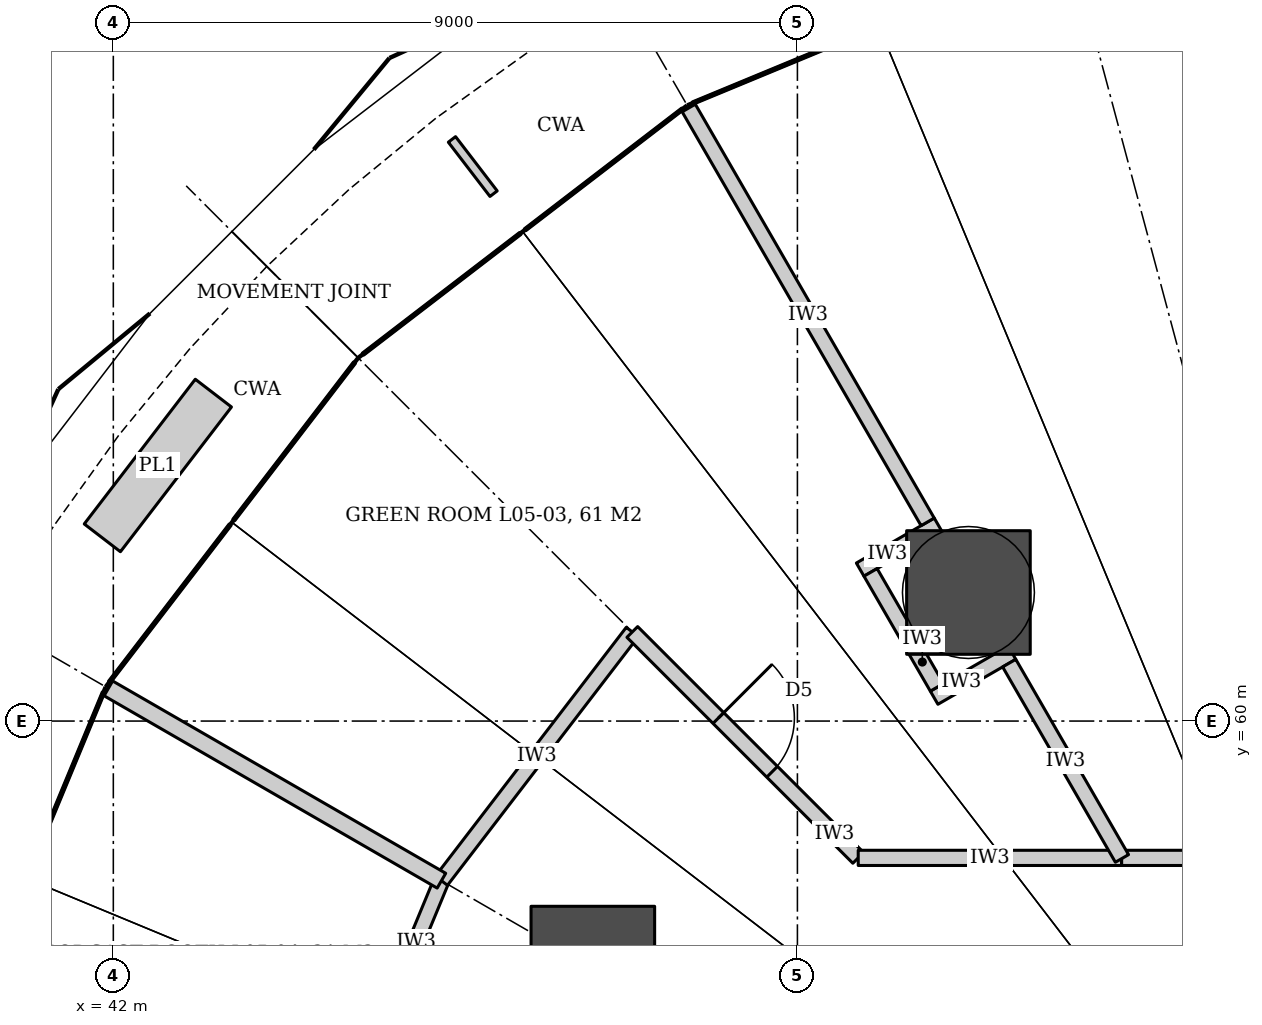
"""IFC4 building model, lengths in metres.
Left out: names, types, materials, properties, quantities, classifications, styles, units other than length and angle.
Written with IfcOpenShell. Run it as: python <this file> out.ifc"""

import sys

from ifc_helpers import new_model, si_unit, direction, frame, frame_2d, origin, origin_2d, place, context, subcontext, project, spatial, rectangle, hollow_circle, extrude, element, fill, save


model = new_model("IFC4")
c1 = context("Model", 3, precision=1e-05, world=origin(), true_north=direction((0.0, 1.0)))
c2 = subcontext(c1, "Body", "Model", "MODEL_VIEW")
j1 = project(units=[si_unit("LENGTHUNIT", "METRE"), si_unit("PLANEANGLEUNIT", "RADIAN")], contexts=[c1])
p1 = place(None, origin())
s1 = spatial("IfcSite", under=j1, at=p1, CompositionType="ELEMENT")
p2 = place(p1, origin())
s2 = spatial("IfcBuilding", under=s1, at=p2, CompositionType="ELEMENT")
p3 = place(p2, frame((0.0, 0.0, 30.2)))
s3 = spatial("IfcBuildingStorey", under=s2, at=p3, CompositionType="ELEMENT", Elevation=30.2)
for number, where, z_axis, x_axis in (
    (1, (53.25, 61.691, 0.0), (0.0, 0.0, 1.0), (1.0, 0.0, 0.0)),
    (2, (48.309, 56.75, 0.0), (0.0, 0.0, 1.0), (1.0, 0.0, 0.0)),
):
    element("IfcColumn", number, at=place(p3, frame(where, z_axis=z_axis, x_axis=x_axis)), inside=s3, PredefinedType="COLUMN", context=c2, shape_type="SweptSolid", body=[
        extrude(hollow_circle(Radius=0.813, WallThickness=0.08, at=origin_2d()), origin(), (0.0, 0.0, 1.0), 4.2),
    ])
p4 = place(p3, frame((44.738, 54.089, 0.0), z_axis=(0.0, 0.0, 1.0), x_axis=(0.382731667114, 0.923859551549, 0.0)))
e3 = element("IfcWall", 3, at=p4, inside=s3, PredefinedType="PARTITIONING", context=c2, shape_type="SweptSolid", body=[
    extrude(rectangle(XDim=4.125, YDim=0.2, at=frame_2d((2.062, 0.0))), origin(), (0.0, 0.0, 1.0), 3.04),
])
p5 = place(p4, frame((1.462, 0.0, 0.0)))
e4 = element("IfcOpeningElement", 4, at=p5, cuts=e3, PredefinedType="OPENING", context=c2, shape_type="SweptSolid", body=[
    extrude(rectangle(XDim=1.2, YDim=2.4, at=frame_2d((0.6, 1.2))), frame((0.0, 0.11, 0.0), z_axis=(0.0, -1.0, 0.0), x_axis=(1.0, 0.0, 0.0)), (0.0, 0.0, 1.0), 0.22),
])
p6 = place(p3, frame((46.317, 57.9, 0.0), z_axis=(0.0, 0.0, 1.0), x_axis=(0.608714823874, 0.793389099494, 0.0)))
e5 = element("IfcWall", 5, at=p6, inside=s3, PredefinedType="PARTITIONING", context=c2, shape_type="SweptSolid", body=[
    extrude(rectangle(XDim=4.125, YDim=0.2, at=frame_2d((2.062, 0.0))), origin(), (0.0, 0.0, 1.0), 3.04),
])
p7 = place(p3, frame((48.828, 61.172, 0.0), z_axis=(0.0, 0.0, 1.0), x_axis=(0.707106781187, -0.707106781187, 0.0)))
e6 = element("IfcWall", 6, at=p7, inside=s3, PredefinedType="PARTITIONING", context=c2, shape_type="SweptSolid", body=[
    extrude(rectangle(XDim=4.204, YDim=0.2, at=frame_2d((2.102, 0.0))), origin(), (0.0, 0.0, 1.0), 3.02),
])
p8 = place(p7, frame((1.602, 0.0, 0.0)))
e7 = element("IfcOpeningElement", 7, at=p8, cuts=e6, PredefinedType="OPENING", context=c2, shape_type="SweptSolid", body=[
    extrude(rectangle(XDim=1.0, YDim=2.1, at=frame_2d((0.5, 1.05))), frame((0.0, 0.11, 0.0), z_axis=(0.0, -1.0, 0.0), x_axis=(1.0, 0.0, 0.0)), (0.0, 0.0, 1.0), 0.22),
])
p9 = place(p3, frame((51.8, 58.2, 0.0), z_axis=(0.0, 0.0, 1.0), x_axis=(1.0, 0.0, 0.0)))
e8 = element("IfcWall", 8, at=p9, inside=s3, PredefinedType="PARTITIONING", context=c2, shape_type="SweptSolid", body=[
    extrude(rectangle(XDim=3.466, YDim=0.2, at=frame_2d((1.733, 0.0))), origin(), (0.0, 0.0, 1.0), 3.04),
])
p10 = place(p3, frame((55.266, 58.2, 0.0), z_axis=(0.0, 0.0, 1.0), x_axis=(1.0, 0.0, 0.0)))
e9 = element("IfcWall", 9, at=p10, inside=s3, PredefinedType="PARTITIONING", context=c2, shape_type="SweptSolid", body=[
    extrude(rectangle(XDim=12.934, YDim=0.2, at=frame_2d((6.467, 0.0))), origin(), (0.0, 0.0, 1.0), 3.04),
])
p11 = place(p10, frame((5.467, 0.0, 0.0)))
e10 = element("IfcOpeningElement", 10, at=p11, cuts=e9, PredefinedType="OPENING", context=c2, shape_type="SweptSolid", body=[
    extrude(rectangle(XDim=2.0, YDim=2.1, at=frame_2d((1.0, 1.05))), frame((0.0, 0.11, 0.0), z_axis=(0.0, -1.0, 0.0), x_axis=(1.0, 0.0, 0.0)), (0.0, 0.0, 1.0), 0.22),
])
for number, where, z_axis, x_axis in (
    (11, (53.823, 60.899, 0.0), (0.0, 0.0, 1.0), (-0.866, -0.5, 0.0)),
    (12, (52.85, 62.584, 0.0), (0.0, 0.0, 1.0), (-0.866, -0.5, 0.0)),
):
    element("IfcWall", number, at=place(p3, frame(where, z_axis=z_axis, x_axis=x_axis)), inside=s3, PredefinedType="PARTITIONING", context=c2, shape_type="SweptSolid", body=[
        extrude(rectangle(XDim=1.183, YDim=0.2, at=frame_2d((0.591, 0.0))), origin(), (0.0, 0.0, 1.0), 3.02),
    ])
p12 = place(p3, frame((52.835, 60.444, 0.0), z_axis=(0.0, 0.0, 1.0), x_axis=(-0.500049268192, 0.865996956912, 0.0)))
e13 = element("IfcWall", 13, at=p12, inside=s3, PredefinedType="PARTITIONING", context=c2, shape_type="SweptSolid", body=[
    extrude(rectangle(XDim=1.746, YDim=0.2, at=frame_2d((0.873, 0.0))), origin(), (0.0, 0.0, 1.0), 3.02),
])
p13 = place(p3, frame((55.27, 58.193, 0.0), z_axis=(0.0, 0.0, 1.0), x_axis=(-0.499962256537, 0.866047193886, 0.0)))
e14 = element("IfcWall", 14, at=p13, inside=s3, PredefinedType="PARTITIONING", context=c2, shape_type="SweptSolid", body=[
    extrude(rectangle(XDim=2.967, YDim=0.2, at=frame_2d((1.483, 0.0))), origin(), (0.0, 0.0, 1.0), 3.04),
])
p14 = place(p3, frame((52.713, 62.621, 0.0), z_axis=(0.0, 0.0, 1.0), x_axis=(-0.499985776458, 0.866033615595, 0.0)))
e15 = element("IfcWall", 15, at=p14, inside=s3, PredefinedType="PARTITIONING", context=c2, shape_type="SweptSolid", body=[
    extrude(rectangle(XDim=6.287, YDim=0.2, at=frame_2d((3.144, 0.0))), origin(), (0.0, 0.0, 1.0), 3.04),
])
p15 = place(p3, frame((46.317, 57.9, 0.0), z_axis=(0.0, 0.0, 1.0), x_axis=(-0.866022478443, 0.500005066806, 0.0)))
e16 = element("IfcWall", 16, at=p15, inside=s3, PredefinedType="PARTITIONING", context=c2, shape_type="SweptSolid", body=[
    extrude(rectangle(XDim=5.06, YDim=0.225, at=frame_2d((2.53, 0.0))), origin(), (0.0, 0.0, 1.0), 3.04),
])
p16 = place(p8, origin())
e17 = element("IfcDoor", 17, at=p16, inside=s3, OperationType="SINGLE_SWING_LEFT", PredefinedType="DOOR", context=c2, shape_type="SweptSolid", body=[
    extrude(rectangle(XDim=1.0, YDim=2.1, at=frame_2d((0.5, 1.05))), frame((0.0, 0.025, 0.0), z_axis=(0.0, -1.0, 0.0), x_axis=(1.0, 0.0, 0.0)), (0.0, 0.0, 1.0), 0.05),
])
fill(e7, e17)
save(model, sys.argv[1])
